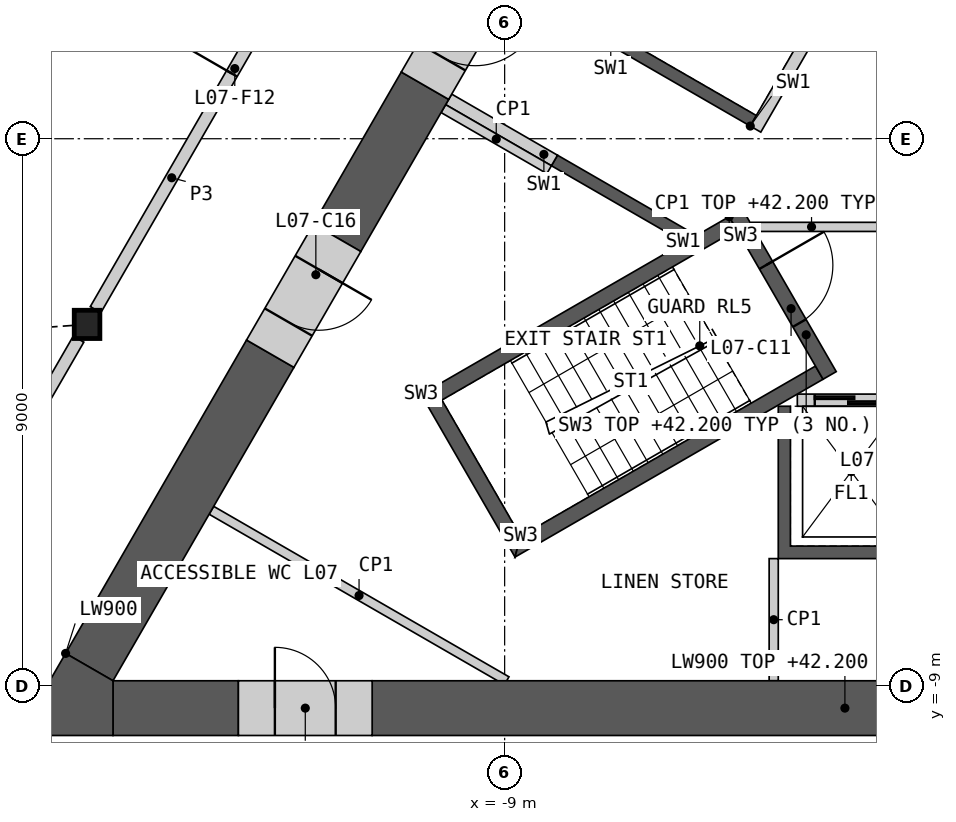
"""IFC4 building model, lengths in metres.
Left out: names, types, materials, properties, quantities, classifications, styles, units other than length and angle.
Written with IfcOpenShell. Run it as: python <this file> out.ifc"""

import sys

from ifc_helpers import new_model, si_unit, direction, frame, frame_2d, origin, origin_2d, place, context, subcontext, project, spatial, polyline, rectangle, i_section, outline, extrude, element, fill, save


model = new_model("IFC4")
c1 = context("Model", 3, precision=1e-05, world=origin(), true_north=direction((0.0, 1.0)))
c2 = subcontext(c1, "Body", "Model", "MODEL_VIEW")
j1 = project(units=[si_unit("LENGTHUNIT", "METRE"), si_unit("PLANEANGLEUNIT", "RADIAN")], contexts=[c1])
p1 = place(None, origin())
s1 = spatial("IfcSite", under=j1, at=p1, CompositionType="ELEMENT")
p2 = place(p1, origin())
s2 = spatial("IfcBuilding", under=s1, at=p2, CompositionType="ELEMENT")
p3 = place(p2, frame((0.0, 0.0, 38.4)))
s3 = spatial("IfcBuildingStorey", under=s2, at=p3, CompositionType="ELEMENT", Elevation=38.4)
p4 = place(p3, frame((-15.868, -3.054, 0.0), z_axis=(0.0, 0.0, 1.0), x_axis=(1.0, 0.0, 0.0)))
e1 = element("IfcColumn", 1, at=p4, inside=s3, PredefinedType="COLUMN", context=c2, shape_type="SweptSolid", body=[
    extrude(i_section(OverallWidth=0.421, OverallDepth=0.465, WebThickness=0.045, FlangeThickness=0.072, at=origin_2d()), origin(), (0.0, 0.0, 1.0), 4.2),
])
p5 = place(p3, origin())
e2 = element("IfcWall", 2, at=p5, inside=s3, PredefinedType="SHEAR", context=c2, shape_type="SweptSolid", body=[
    extrude(outline(polyline([(4.5, -4.4), (4.5, -6.906), (-4.5, -6.906), (-4.5, -4.4), (-4.3, -4.4), (-4.3, -6.7), (-2.3, -6.7), (-2.3, -4.4), (-2.1, -4.4), (-2.1, -6.7), (-0.1, -6.7), (-0.1, -4.4), (0.1, -4.4), (0.1, -6.7), (2.1, -6.7), (2.1, -4.4), (2.3, -4.4), (2.3, -6.7), (4.3, -6.7), (4.3, -4.4), (4.5, -4.4)])), origin(), (0.0, 0.0, 1.0), 3.8),
])
p6 = place(p3, frame((-4.187, -4.3, 0.0), z_axis=(0.0, 0.0, 1.0), x_axis=(1.0, 0.0, 0.0)))
e3 = element("IfcWall", 3, at=p6, inside=s3, PredefinedType="SOLIDWALL", context=c2, shape_type="SweptSolid", body=[
    extrude(rectangle(XDim=8.373, YDim=0.2, at=frame_2d((4.187, 0.0))), origin(), (0.0, 0.0, 1.0), 3.8),
])
p7 = place(p6, frame((0.287, 0.0, 0.0)))
e4 = element("IfcOpeningElement", 4, at=p7, cuts=e3, PredefinedType="OPENING", context=c2, shape_type="SweptSolid", body=[
    extrude(rectangle(XDim=1.2, YDim=2.1, at=frame_2d((0.6, 1.05))), frame((0.0, 0.11, 0.0), z_axis=(0.0, -1.0, 0.0), x_axis=(1.0, 0.0, 0.0)), (0.0, 0.0, 1.0), 0.22),
])
p8 = place(p6, frame((2.387, 0.0, 0.0)))
e5 = element("IfcOpeningElement", 5, at=p8, cuts=e3, PredefinedType="OPENING", context=c2, shape_type="SweptSolid", body=[
    extrude(rectangle(XDim=1.4, YDim=2.1, at=frame_2d((0.7, 1.05))), frame((0.0, 0.11, 0.0), z_axis=(0.0, -1.0, 0.0), x_axis=(1.0, 0.0, 0.0)), (0.0, 0.0, 1.0), 0.22),
])
p9 = place(p6, frame((4.737, 0.0, 0.0)))
e6 = element("IfcOpeningElement", 6, at=p9, cuts=e3, PredefinedType="OPENING", context=c2, shape_type="SweptSolid", body=[
    extrude(rectangle(XDim=1.1, YDim=2.1, at=frame_2d((0.55, 1.05))), frame((0.0, 0.11, 0.0), z_axis=(0.0, -1.0, 0.0), x_axis=(1.0, 0.0, 0.0)), (0.0, 0.0, 1.0), 0.22),
])
p10 = place(p6, frame((6.887, 0.0, 0.0)))
e7 = element("IfcOpeningElement", 7, at=p10, cuts=e3, PredefinedType="OPENING", context=c2, shape_type="SweptSolid", body=[
    extrude(rectangle(XDim=1.2, YDim=2.1, at=frame_2d((0.6, 1.05))), frame((0.0, 0.11, 0.0), z_axis=(0.0, -1.0, 0.0), x_axis=(1.0, 0.0, 0.0)), (0.0, 0.0, 1.0), 0.22),
])
p11 = place(p3, origin())
e8 = element("IfcWall", 8, at=p11, inside=s3, PredefinedType="SHEAR", context=c2, shape_type="SweptSolid", body=[
    extrude(outline(polyline([(-6.061, -1.697), (-8.231, -0.444), (-8.131, -0.271), (-5.96, -1.524), (-6.061, -1.697)])), origin(), (0.0, 0.0, 1.0), 3.8),
])
p12 = place(p3, origin())
e9 = element("IfcWall", 9, at=p12, inside=s3, PredefinedType="SHEAR", context=c2, shape_type="SweptSolid", body=[
    extrude(outline(polyline([(-4.96, 0.208), (-7.131, 1.461), (-3.731, 7.35), (-1.561, 6.097), (-1.66, 5.924), (-3.652, 7.074), (-5.752, 3.437), (-3.76, 2.287), (-3.861, 2.113), (-5.852, 3.263), (-6.852, 1.531), (-4.861, 0.381), (-4.96, 0.208)])), origin(), (0.0, 0.0, 1.0), 3.8),
])
p13 = place(p3, frame((-1.631, 5.776, 0.0), z_axis=(0.0, 0.0, 1.0), x_axis=(-0.499992876559, -0.866029516466, 0.0)))
e10 = element("IfcWall", 10, at=p13, inside=s3, PredefinedType="SOLIDWALL", context=c2, shape_type="SweptSolid", body=[
    extrude(rectangle(XDim=6.486, YDim=0.2, at=frame_2d((3.243, 0.0))), origin(), (0.0, 0.0, 1.0), 3.8),
])
p14 = place(p13, frame((1.537, 0.0, 0.0)))
e11 = element("IfcOpeningElement", 11, at=p14, cuts=e10, PredefinedType="OPENING", context=c2, shape_type="SweptSolid", body=[
    extrude(rectangle(XDim=0.9, YDim=2.1, at=frame_2d((0.45, 1.05))), frame((0.0, 0.11, 0.0), z_axis=(0.0, -1.0, 0.0), x_axis=(1.0, 0.0, 0.0)), (0.0, 0.0, 1.0), 0.22),
])
p15 = place(p3, frame((-8.181, -0.357, 0.0), z_axis=(0.0, 0.0, 1.0), x_axis=(-0.866035824272, 0.499981950752, 0.0)))
e12 = element("IfcWall", 12, at=p15, inside=s3, PredefinedType="SHEAR", context=c2, shape_type="SweptSolid", body=[
    extrude(rectangle(XDim=2.009, YDim=0.2, at=frame_2d((1.004, 0.0))), origin(), (0.0, 0.0, 1.0), 3.8),
])
p16 = place(p3, frame((-4.941, -1.45, 0.0), z_axis=(0.0, 0.0, 1.0), x_axis=(1.0, 0.0, 0.0)))
e13 = element("IfcWall", 13, at=p16, inside=s3, PredefinedType="PARTITIONING", context=c2, shape_type="SweptSolid", body=[
    extrude(rectangle(XDim=9.882, YDim=0.15, at=frame_2d((4.941, 0.0))), origin(), (0.0, 0.0, 1.0), 3.8),
])
p17 = place(p16, frame((4.391, 0.0, 0.0)))
e14 = element("IfcOpeningElement", 14, at=p17, cuts=e13, PredefinedType="OPENING", context=c2, shape_type="SweptSolid", body=[
    extrude(rectangle(XDim=1.1, YDim=2.1, at=frame_2d((0.55, 1.05))), frame((0.0, 0.085, 0.0), z_axis=(0.0, -1.0, 0.0), x_axis=(1.0, 0.0, 0.0)), (0.0, 0.0, 1.0), 0.17),
])
p18 = place(p3, origin())
e15 = element("IfcWall", 15, at=p18, inside=s3, PredefinedType="SHEAR", context=c2, shape_type="SweptSolid", body=[
    extrude(outline(polyline([(-5.307, -1.281), (-10.374, -4.206), (-10.032, -4.298), (-5.182, -1.498), (-5.307, -1.281)])), origin(), (0.0, 0.0, 1.0), 3.8),
])
p19 = place(p3, origin())
e16 = element("IfcWall", 16, at=p19, inside=s3, PredefinedType="SHEAR", context=c2, shape_type="SweptSolid", body=[
    extrude(outline(polyline([(-10.374, -4.206), (-8.83, -6.881), (-8.738, -6.539), (-10.032, -4.298), (-10.374, -4.206)])), origin(), (0.0, 0.0, 1.0), 3.8),
])
p20 = place(p3, origin())
e17 = element("IfcWall", 17, at=p20, inside=s3, PredefinedType="SHEAR", context=c2, shape_type="SweptSolid", body=[
    extrude(outline(polyline([(-8.738, -6.539), (-8.83, -6.881), (-3.763, -3.956), (-3.888, -3.739), (-8.738, -6.539)])), origin(), (0.0, 0.0, 1.0), 3.8),
])
p21 = place(p3, frame((-5.199, -1.219, 0.0), z_axis=(0.0, 0.0, 1.0), x_axis=(0.499982516597, -0.866035497597, 0.0)))
e18 = element("IfcWall", 18, at=p21, inside=s3, PredefinedType="SHEAR", context=c2, shape_type="SweptSolid", body=[
    extrude(rectangle(XDim=3.088, YDim=0.25, at=frame_2d((1.544, 0.0))), origin(), (0.0, 0.0, 1.0), 3.8),
])
p22 = place(p21, frame((0.994, 0.0, 0.0)))
e19 = element("IfcOpeningElement", 19, at=p22, cuts=e18, PredefinedType="OPENING", context=c2, shape_type="SweptSolid", body=[
    extrude(rectangle(XDim=1.1, YDim=2.1, at=frame_2d((0.55, 1.05))), frame((0.0, 0.135, 0.0), z_axis=(0.0, -1.0, 0.0), x_axis=(1.0, 0.0, 0.0)), (0.0, 0.0, 1.0), 0.27),
])
p23 = place(p3, frame((-8.268, -0.509, 0.0), z_axis=(0.0, 0.0, 1.0), x_axis=(-0.866035824272, 0.499981950752, 0.0)))
e20 = element("IfcWall", 20, at=p23, inside=s3, PredefinedType="PARTITIONING", context=c2, shape_type="SweptSolid", body=[
    extrude(rectangle(XDim=2.009, YDim=0.15, at=frame_2d((1.004, 0.0))), origin(), (0.0, 0.0, 1.0), 3.8),
])
p24 = place(p3, frame((-4.575, -6.906, 0.0), z_axis=(0.0, 0.0, 1.0), x_axis=(0.0, -1.0, 0.0)))
e21 = element("IfcWall", 21, at=p24, inside=s3, PredefinedType="PARTITIONING", context=c2, shape_type="SweptSolid", body=[
    extrude(rectangle(XDim=2.009, YDim=0.15, at=frame_2d((1.004, 0.0))), origin(), (0.0, 0.0, 1.0), 3.8),
])
p25 = place(p3, frame((-13.823, -6.111, 0.0), z_axis=(0.0, 0.0, 1.0), x_axis=(0.866026802741, -0.499997576928, 0.0)))
e22 = element("IfcWall", 22, at=p25, inside=s3, PredefinedType="PARTITIONING", context=c2, shape_type="SweptSolid", body=[
    extrude(rectangle(XDim=5.607, YDim=0.15, at=frame_2d((2.804, 0.0))), origin(), (0.0, 0.0, 1.0), 3.8),
])
p26 = place(p3, frame((-11.179, -9.365, 0.0), z_axis=(0.0, 0.0, 1.0), x_axis=(1.0, 0.0, 0.0)))
e23 = element("IfcWall", 23, at=p26, inside=s3, PredefinedType="SHEAR", context=c2, shape_type="SweptSolid", body=[
    extrude(rectangle(XDim=15.55, YDim=0.9, at=frame_2d((7.775, 0.0))), origin(), (0.0, 0.0, 1.0), 3.8),
])
p27 = place(p3, frame((-15.441, -9.365, 0.0), z_axis=(0.0, 0.0, 1.0), x_axis=(1.0, 0.0, 0.0)))
e24 = element("IfcWall", 24, at=p27, inside=s3, PredefinedType="SHEAR", context=c2, shape_type="SweptSolid", body=[
    extrude(rectangle(XDim=2.062, YDim=0.9, at=frame_2d((1.031, 0.0))), origin(), (0.0, 0.0, 1.0), 3.8),
])
p28 = place(p3, frame((-12.855, -3.536, 0.0), z_axis=(0.0, 0.0, 1.0), x_axis=(-0.499999419053, -0.866025739194, 0.0)))
e25 = element("IfcWall", 25, at=p28, inside=s3, PredefinedType="SHEAR", context=c2, shape_type="SweptSolid", body=[
    extrude(rectangle(XDim=5.952, YDim=0.9, at=frame_2d((2.976, 0.0))), origin(), (0.0, 0.0, 1.0), 3.8),
])
p29 = place(p3, frame((-10.31, 0.872, 0.0), z_axis=(0.0, 0.0, 1.0), x_axis=(-0.499946751862, -0.866056144429, 0.0)))
e26 = element("IfcWall", 26, at=p29, inside=s3, PredefinedType="SHEAR", context=c2, shape_type="SweptSolid", body=[
    extrude(rectangle(XDim=2.889, YDim=0.9, at=frame_2d((1.445, 0.0))), origin(), (0.0, 0.0, 1.0), 3.8),
])
p30 = place(p3, origin())
e27 = element("IfcWall", 27, at=p30, inside=s3, PredefinedType="SHEAR", context=c2, shape_type="SweptSolid", body=[
    extrude(outline(polyline([(-16.221, -8.465), (-15.441, -8.915), (-15.441, -9.815), (-17.0, -9.815), (-16.221, -8.465)])), origin(), (0.0, 0.0, 1.0), 3.8),
])
p31 = place(p3, frame((-13.379, -9.365, 0.0), z_axis=(0.0, 0.0, 1.0), x_axis=(1.0, 0.0, 0.0)))
e28 = element("IfcWall", 28, at=p31, inside=s3, PredefinedType="SHEAR", context=c2, shape_type="SweptSolid", body=[
    extrude(rectangle(XDim=2.2, YDim=0.9, at=frame_2d((1.1, 0.0))), origin(), (0.0, 0.0, 1.0), 3.8),
])
p32 = place(p31, frame((0.6, 0.0, 0.0)))
e29 = element("IfcOpeningElement", 29, at=p32, cuts=e28, PredefinedType="OPENING", context=c2, shape_type="SweptSolid", body=[
    extrude(rectangle(XDim=1.0, YDim=2.1, at=frame_2d((0.5, 1.05))), frame((0.0, 0.46, 0.0), z_axis=(0.0, -1.0, 0.0), x_axis=(1.0, 0.0, 0.0)), (0.0, 0.0, 1.0), 0.92),
])
p33 = place(p3, frame((-11.755, -1.63, 0.0), z_axis=(0.0, 0.0, 1.0), x_axis=(-0.50002983664, -0.866008176907, 0.0)))
e30 = element("IfcWall", 30, at=p33, inside=s3, PredefinedType="SHEAR", context=c2, shape_type="SweptSolid", body=[
    extrude(rectangle(XDim=2.2, YDim=0.9, at=frame_2d((1.1, 0.0))), origin(), (0.0, 0.0, 1.0), 3.8),
])
p34 = place(p33, frame((0.6, 0.0, 0.0)))
e31 = element("IfcOpeningElement", 31, at=p34, cuts=e30, PredefinedType="OPENING", context=c2, shape_type="SweptSolid", body=[
    extrude(rectangle(XDim=1.0, YDim=2.1, at=frame_2d((0.5, 1.05))), frame((0.0, 0.46, 0.0), z_axis=(0.0, -1.0, 0.0), x_axis=(1.0, 0.0, 0.0)), (0.0, 0.0, 1.0), 0.92),
])
p35 = place(p3, frame((-9.21, 2.777, 0.0), z_axis=(0.0, 0.0, 1.0), x_axis=(-0.500077893725, -0.86598042715, 0.0)))
e32 = element("IfcWall", 32, at=p35, inside=s3, PredefinedType="SHEAR", context=c2, shape_type="SweptSolid", body=[
    extrude(rectangle(XDim=2.2, YDim=0.9, at=frame_2d((1.1, 0.0))), origin(), (0.0, 0.0, 1.0), 3.8),
])
p36 = place(p35, frame((0.55, 0.0, 0.0)))
e33 = element("IfcOpeningElement", 33, at=p36, cuts=e32, PredefinedType="OPENING", context=c2, shape_type="SweptSolid", body=[
    extrude(rectangle(XDim=1.1, YDim=2.1, at=frame_2d((0.55, 1.05))), frame((0.0, 0.46, 0.0), z_axis=(0.0, -1.0, 0.0), x_axis=(1.0, 0.0, 0.0)), (0.0, 0.0, 1.0), 0.92),
])
p37 = place(p3, frame((-15.728, -2.811, 0.0), z_axis=(0.0, 0.0, 1.0), x_axis=(0.49999175339, 0.866030164915, 0.0)))
e34 = element("IfcWall", 34, at=p37, inside=s3, PredefinedType="PARTITIONING", context=c2, shape_type="SweptSolid", body=[
    extrude(rectangle(XDim=10.019, YDim=0.2, at=frame_2d((5.009, 0.0))), origin(), (0.0, 0.0, 1.0), 3.8),
])
p38 = place(p37, frame((4.484, 0.0, 0.0)))
e35 = element("IfcOpeningElement", 35, at=p38, cuts=e34, PredefinedType="OPENING", context=c2, shape_type="SweptSolid", body=[
    extrude(rectangle(XDim=0.95, YDim=2.1, at=frame_2d((0.475, 1.05))), frame((0.0, 0.11, 0.0), z_axis=(0.0, -1.0, 0.0), x_axis=(1.0, 0.0, 0.0)), (0.0, 0.0, 1.0), 0.22),
])
p39 = place(p3, frame((-19.244, -8.902, 0.0), z_axis=(0.0, 0.0, 1.0), x_axis=(0.499984737558, 0.86603421538, 0.0)))
e36 = element("IfcWall", 36, at=p39, inside=s3, PredefinedType="PARTITIONING", context=c2, shape_type="SweptSolid", body=[
    extrude(rectangle(XDim=6.473, YDim=0.2, at=frame_2d((3.236, 0.0))), origin(), (0.0, 0.0, 1.0), 3.8),
])
p40 = place(p3, frame((-22.335, -7.455, 0.0), z_axis=(0.0, 0.0, 1.0), x_axis=(0.499997414609, 0.866026896456, 0.0)))
e37 = element("IfcWall", 37, at=p40, inside=s3, PredefinedType="PARTITIONING", context=c2, shape_type="SweptSolid", body=[
    extrude(rectangle(XDim=17.524, YDim=0.2, at=frame_2d((8.762, 0.0))), origin(), (0.0, 0.0, 1.0), 2.885),
])
p41 = place(p40, frame((7.584, 0.0, 0.0)))
e38 = element("IfcOpeningElement", 38, at=p41, cuts=e37, PredefinedType="OPENING", context=c2, shape_type="SweptSolid", body=[
    extrude(rectangle(XDim=0.95, YDim=2.1, at=frame_2d((0.475, 1.05))), frame((0.0, 0.11, 0.0), z_axis=(0.0, -1.0, 0.0), x_axis=(1.0, 0.0, 0.0)), (0.0, 0.0, 1.0), 0.22),
])
p42 = place(p7, origin())
e39 = element("IfcDoor", 39, at=p42, inside=s3, OperationType="SLIDING_TO_LEFT", PredefinedType="DOOR", context=c2, shape_type="SweptSolid", body=[
    extrude(rectangle(XDim=1.2, YDim=2.1, at=frame_2d((0.6, 1.05))), frame((0.0, 0.025, 0.0), z_axis=(0.0, -1.0, 0.0), x_axis=(1.0, 0.0, 0.0)), (0.0, 0.0, 1.0), 0.05),
])
fill(e4, e39)
p43 = place(p22, origin())
e40 = element("IfcDoor", 40, at=p43, inside=s3, OperationType="SINGLE_SWING_LEFT", PredefinedType="DOOR", context=c2, shape_type="SweptSolid", body=[
    extrude(rectangle(XDim=1.1, YDim=2.1, at=frame_2d((0.55, 1.05))), frame((0.0, 0.025, 0.0), z_axis=(0.0, -1.0, 0.0), x_axis=(1.0, 0.0, 0.0)), (0.0, 0.0, 1.0), 0.05),
])
fill(e19, e40)
p44 = place(p32, origin())
e41 = element("IfcDoor", 41, at=p44, inside=s3, OperationType="SINGLE_SWING_LEFT", PredefinedType="DOOR", context=c2, shape_type="SweptSolid", body=[
    extrude(rectangle(XDim=1.0, YDim=2.1, at=frame_2d((0.5, 1.05))), frame((0.0, 0.205, 0.0), z_axis=(0.0, -1.0, 0.0), x_axis=(1.0, 0.0, 0.0)), (0.0, 0.0, 1.0), 0.05),
])
fill(e29, e41)
p45 = place(p34, origin())
e42 = element("IfcDoor", 42, at=p45, inside=s3, OperationType="SINGLE_SWING_LEFT", PredefinedType="DOOR", context=c2, shape_type="SweptSolid", body=[
    extrude(rectangle(XDim=1.0, YDim=2.1, at=frame_2d((0.5, 1.05))), frame((0.0, 0.205, 0.0), z_axis=(0.0, -1.0, 0.0), x_axis=(1.0, 0.0, 0.0)), (0.0, 0.0, 1.0), 0.05),
])
fill(e31, e42)
p46 = place(p36, origin())
e43 = element("IfcDoor", 43, at=p46, inside=s3, OperationType="SINGLE_SWING_LEFT", PredefinedType="DOOR", context=c2, shape_type="SweptSolid", body=[
    extrude(rectangle(XDim=1.1, YDim=2.1, at=frame_2d((0.55, 1.05))), frame((0.0, 0.205, 0.0), z_axis=(0.0, -1.0, 0.0), x_axis=(1.0, 0.0, 0.0)), (0.0, 0.0, 1.0), 0.05),
])
fill(e33, e43)
p47 = place(p38, origin())
e44 = element("IfcDoor", 44, at=p47, inside=s3, OperationType="SINGLE_SWING_LEFT", PredefinedType="DOOR", context=c2, shape_type="SweptSolid", body=[
    extrude(rectangle(XDim=0.95, YDim=2.1, at=frame_2d((0.475, 1.05))), frame((0.0, 0.025, 0.0), z_axis=(0.0, -1.0, 0.0), x_axis=(1.0, 0.0, 0.0)), (0.0, 0.0, 1.0), 0.05),
])
fill(e35, e44)
save(model, sys.argv[1])
